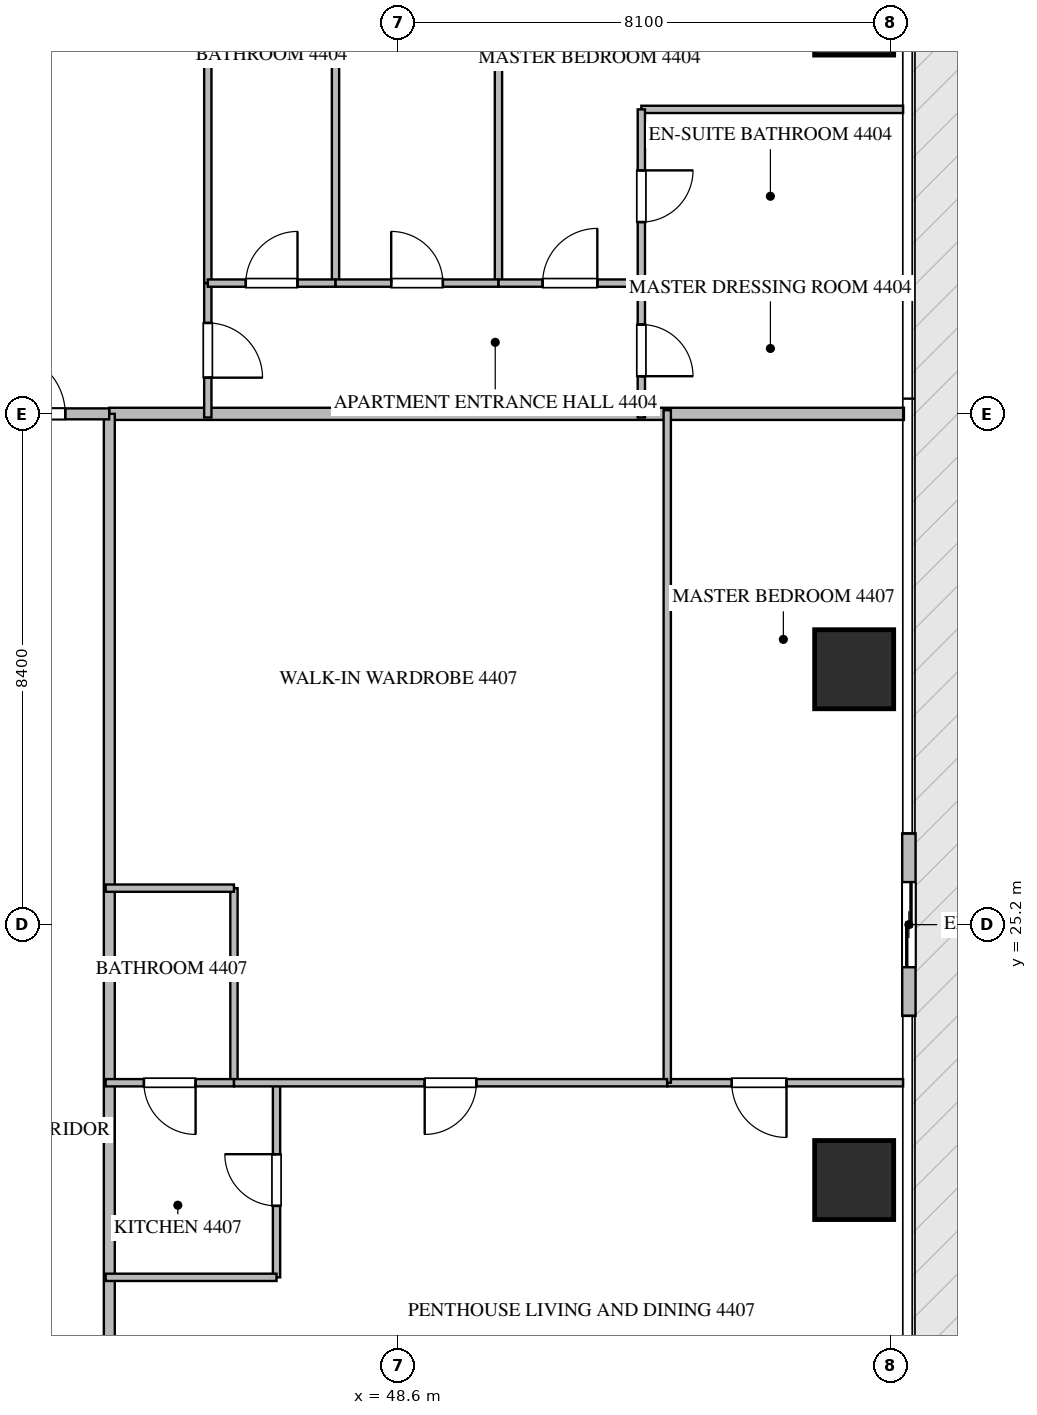
"""IFC4 building model, lengths in metres.
Left out: names, types, materials, properties, quantities, classifications, styles, units other than length and angle.
Written with IfcOpenShell. Run it as: python <this file> out.ifc"""

import sys

from ifc_helpers import new_model, si_unit, direction, frame, frame_2d, origin, origin_2d, place, context, subcontext, project, spatial, rectangle, extrude, source, transform, mapped, element, fill, save


model = new_model("IFC4")
c1 = context("Model", 3, precision=1e-05, world=origin(), true_north=direction((0.0, 1.0)))
c2 = subcontext(c1, "Body", "Model", "MODEL_VIEW")
j1 = project(units=[si_unit("LENGTHUNIT", "METRE"), si_unit("PLANEANGLEUNIT", "RADIAN")], contexts=[c1])
p1 = place(None, origin())
s1 = spatial("IfcSite", under=j1, at=p1, CompositionType="ELEMENT")
p2 = place(p1, origin())
s2 = spatial("IfcBuilding", under=s1, at=p2, CompositionType="ELEMENT")
p3 = place(p2, frame((0.0, 0.0, 176.4)))
s3 = spatial("IfcBuildingStorey", under=s2, at=p3, CompositionType="ELEMENT", Elevation=176.4)
m1 = source(origin(), c2, "Body", "SweptSolid", [
    extrude(rectangle(XDim=1.3, YDim=1.3, at=origin_2d()), origin(), (0.0, 0.0, 1.0), 3.75),
])
for number, where, z_axis, x_axis in (
    (1, (56.1, 21.0, -0.26), (0.0, 0.0, 1.0), (1.0, 0.0, 0.0)),
    (2, (56.1, 29.4, -0.26), (0.0, 0.0, 1.0), (1.0, 0.0, 0.0)),
    (3, (56.1, 40.15, -0.26), (0.0, 0.0, 1.0), (1.0, 0.0, 0.0)),
):
    element("IfcColumn", number, at=place(p3, frame(where, z_axis=z_axis, x_axis=x_axis)), inside=s3, PredefinedType="COLUMN", context=c2, shape_type="MappedRepresentation", body=[
        mapped(m1, transform((0.0, 0.0, 0.0), scale=1.0)),
    ])
p4 = place(p3, frame((57.0, 23.7, 0.0), z_axis=(0.0, 0.0, 1.0), x_axis=(0.0, 1.0, 0.0)))
e4 = element("IfcWall", 4, at=p4, inside=s3, PredefinedType="ELEMENTEDWALL", context=c2, shape_type="SweptSolid", body=[
    extrude(rectangle(XDim=3.0, YDim=0.22, at=frame_2d((1.5, 0.0))), origin(), (0.0, 0.0, 1.0), 3.475),
])
p5 = place(p4, frame((0.8, 0.0, 0.0)))
e5 = element("IfcOpeningElement", 5, at=p5, cuts=e4, PredefinedType="OPENING", context=c2, shape_type="SweptSolid", body=[
    extrude(rectangle(XDim=1.4, YDim=2.25, at=frame_2d((0.7, 1.125))), frame((0.0, 0.12, 0.0), z_axis=(0.0, -1.0, 0.0), x_axis=(1.0, 0.0, 0.0)), (0.0, 0.0, 1.0), 0.24),
])
p6 = place(p3, frame((43.85, 33.6, 0.0), z_axis=(0.0, 0.0, 1.0), x_axis=(1.0, 0.0, 0.0)))
e6 = element("IfcWall", 6, at=p6, inside=s3, PredefinedType="PARTITIONING", context=c2, shape_type="SweptSolid", body=[
    extrude(rectangle(XDim=13.068, YDim=0.2, at=frame_2d((6.534, 0.0))), origin(), (0.0, 0.0, 1.0), 3.49),
])
p7 = place(p3, frame((43.85, 14.9, 0.0), z_axis=(0.0, 0.0, 1.0), x_axis=(0.0, 1.0, 0.0)))
e7 = element("IfcWall", 7, at=p7, inside=s3, PredefinedType="PARTITIONING", context=c2, shape_type="SweptSolid", body=[
    extrude(rectangle(XDim=18.7, YDim=0.18, at=frame_2d((9.35, 0.0))), origin(), (0.0, 0.0, 1.0), 3.49),
])
p8 = place(p7, frame((1.805, 0.0, 0.0)))
e8 = element("IfcOpeningElement", 8, at=p8, cuts=e7, PredefinedType="OPENING", context=c2, shape_type="SweptSolid", body=[
    extrude(rectangle(XDim=1.0, YDim=2.15, at=frame_2d((0.5, 1.075))), frame((0.0, 0.1, 0.0), z_axis=(0.0, -1.0, 0.0), x_axis=(1.0, 0.0, 0.0)), (0.0, 0.0, 1.0), 0.2),
])
p9 = place(p3, frame((41.402, 33.6, 0.0), z_axis=(0.0, 0.0, 1.0), x_axis=(1.0, 0.0, 0.0)))
e9 = element("IfcWall", 9, at=p9, inside=s3, PredefinedType="PARTITIONING", context=c2, shape_type="SweptSolid", body=[
    extrude(rectangle(XDim=2.446, YDim=0.18, at=frame_2d((1.223, 0.0))), origin(), (0.0, 0.0, 1.0), 3.49),
])
p10 = place(p9, frame((0.723, 0.0, 0.0)))
e10 = element("IfcOpeningElement", 10, at=p10, cuts=e9, PredefinedType="OPENING", context=c2, shape_type="SweptSolid", body=[
    extrude(rectangle(XDim=1.0, YDim=2.15, at=frame_2d((0.5, 1.075))), frame((0.0, 0.1, 0.0), z_axis=(0.0, -1.0, 0.0), x_axis=(1.0, 0.0, 0.0)), (0.0, 0.0, 1.0), 0.2),
])
p11 = place(p3, frame((45.47, 35.75, 0.0), z_axis=(0.0, 0.0, 1.0), x_axis=(0.0, -1.0, 0.0)))
e11 = element("IfcWall", 11, at=p11, inside=s3, PredefinedType="PARTITIONING", context=c2, shape_type="SweptSolid", body=[
    extrude(rectangle(XDim=2.21, YDim=0.12, at=frame_2d((1.105, 0.0))), origin(), (0.0, 0.0, 1.0), 3.49),
])
p12 = place(p11, frame((0.655, 0.0, 0.0)))
e12 = element("IfcOpeningElement", 12, at=p12, cuts=e11, PredefinedType="OPENING", context=c2, shape_type="SweptSolid", body=[
    extrude(rectangle(XDim=0.9, YDim=2.1, at=frame_2d((0.45, 1.05))), frame((0.0, 0.07, 0.0), z_axis=(0.0, -1.0, 0.0), x_axis=(1.0, 0.0, 0.0)), (0.0, 0.0, 1.0), 0.14),
])
p13 = place(p3, frame((45.47, 43.46, 0.0), z_axis=(0.0, 0.0, 1.0), x_axis=(0.0, -1.0, 0.0)))
e13 = element("IfcWall", 13, at=p13, inside=s3, PredefinedType="PARTITIONING", context=c2, shape_type="SweptSolid", body=[
    extrude(rectangle(XDim=7.708, YDim=0.12, at=frame_2d((3.854, 0.0))), origin(), (0.0, 0.0, 1.0), 3.49),
])
p14 = place(p3, frame((50.25, 44.905, 0.0), z_axis=(0.0, 0.0, 1.0), x_axis=(0.0, -1.0, 0.0)))
e14 = element("IfcWall", 14, at=p14, inside=s3, PredefinedType="PARTITIONING", context=c2, shape_type="SweptSolid", body=[
    extrude(rectangle(XDim=9.155, YDim=0.12, at=frame_2d((4.578, 0.0))), origin(), (0.0, 0.0, 1.0), 3.49),
])
p15 = place(p3, frame((47.57, 43.462, 0.0), z_axis=(0.0, 0.0, 1.0), x_axis=(0.0, -1.0, 0.0)))
e15 = element("IfcWall", 15, at=p15, inside=s3, PredefinedType="PARTITIONING", context=c2, shape_type="SweptSolid", body=[
    extrude(rectangle(XDim=7.712, YDim=0.12, at=frame_2d((3.856, 0.0))), origin(), (0.0, 0.0, 1.0), 3.49),
])
p16 = place(p3, frame((45.47, 35.75, 0.0), z_axis=(0.0, 0.0, 1.0), x_axis=(1.0, 0.0, 0.0)))
e16 = element("IfcWall", 16, at=p16, inside=s3, PredefinedType="PARTITIONING", context=c2, shape_type="SweptSolid", body=[
    extrude(rectangle(XDim=2.1, YDim=0.12, at=frame_2d((1.05, 0.0))), origin(), (0.0, 0.0, 1.0), 3.49),
])
p17 = place(p16, frame((0.625, 0.0, 0.0)))
e17 = element("IfcOpeningElement", 17, at=p17, cuts=e16, PredefinedType="OPENING", context=c2, shape_type="SweptSolid", body=[
    extrude(rectangle(XDim=0.85, YDim=2.1, at=frame_2d((0.425, 1.05))), frame((0.0, 0.07, 0.0), z_axis=(0.0, -1.0, 0.0), x_axis=(1.0, 0.0, 0.0)), (0.0, 0.0, 1.0), 0.14),
])
p18 = place(p3, frame((47.572, 35.75, 0.0), z_axis=(0.0, 0.0, 1.0), x_axis=(1.0, 0.0, 0.0)))
e18 = element("IfcWall", 18, at=p18, inside=s3, PredefinedType="PARTITIONING", context=c2, shape_type="SweptSolid", body=[
    extrude(rectangle(XDim=2.678, YDim=0.12, at=frame_2d((1.339, 0.0))), origin(), (0.0, 0.0, 1.0), 3.49),
])
p19 = place(p18, frame((0.914, 0.0, 0.0)))
e19 = element("IfcOpeningElement", 19, at=p19, cuts=e18, PredefinedType="OPENING", context=c2, shape_type="SweptSolid", body=[
    extrude(rectangle(XDim=0.85, YDim=2.1, at=frame_2d((0.425, 1.05))), frame((0.0, 0.07, 0.0), z_axis=(0.0, -1.0, 0.0), x_axis=(1.0, 0.0, 0.0)), (0.0, 0.0, 1.0), 0.14),
])
p20 = place(p3, frame((50.252, 35.75, 0.0), z_axis=(0.0, 0.0, 1.0), x_axis=(1.0, 0.0, 0.0)))
e20 = element("IfcWall", 20, at=p20, inside=s3, PredefinedType="PARTITIONING", context=c2, shape_type="SweptSolid", body=[
    extrude(rectangle(XDim=2.348, YDim=0.12, at=frame_2d((1.174, 0.0))), origin(), (0.0, 0.0, 1.0), 3.49),
])
p21 = place(p20, frame((0.724, 0.0, 0.0)))
e21 = element("IfcOpeningElement", 21, at=p21, cuts=e20, PredefinedType="OPENING", context=c2, shape_type="SweptSolid", body=[
    extrude(rectangle(XDim=0.9, YDim=2.1, at=frame_2d((0.45, 1.05))), frame((0.0, 0.07, 0.0), z_axis=(0.0, -1.0, 0.0), x_axis=(1.0, 0.0, 0.0)), (0.0, 0.0, 1.0), 0.14),
])
p22 = place(p3, frame((52.6, 38.607, 0.0), z_axis=(0.0, 0.0, 1.0), x_axis=(1.0, 0.0, 0.0)))
e22 = element("IfcWall", 22, at=p22, inside=s3, PredefinedType="PARTITIONING", context=c2, shape_type="SweptSolid", body=[
    extrude(rectangle(XDim=4.305, YDim=0.12, at=frame_2d((2.152, 0.0))), origin(), (0.0, 0.0, 1.0), 3.49),
])
p23 = place(p3, frame((52.602, 35.75, 0.0), z_axis=(0.0, 0.0, 1.0), x_axis=(1.0, 0.0, 0.0)))
e23 = element("IfcWall", 23, at=p23, inside=s3, PredefinedType="PARTITIONING", context=c2, shape_type="SweptSolid", body=[
    extrude(rectangle(XDim=4.303, YDim=0.12, at=frame_2d((2.151, 0.0))), origin(), (0.0, 0.0, 1.0), 3.49),
])
p24 = place(p3, frame((52.6, 38.607, 0.0), z_axis=(0.0, 0.0, 1.0), x_axis=(0.0, -1.0, 0.0)))
e24 = element("IfcWall", 24, at=p24, inside=s3, PredefinedType="PARTITIONING", context=c2, shape_type="SweptSolid", body=[
    extrude(rectangle(XDim=2.857, YDim=0.12, at=frame_2d((1.428, 0.0))), origin(), (0.0, 0.0, 1.0), 3.49),
])
p25 = place(p24, frame((1.003, 0.0, 0.0)))
e25 = element("IfcOpeningElement", 25, at=p25, cuts=e24, PredefinedType="OPENING", context=c2, shape_type="SweptSolid", body=[
    extrude(rectangle(XDim=0.85, YDim=2.1, at=frame_2d((0.425, 1.05))), frame((0.0, 0.07, 0.0), z_axis=(0.0, -1.0, 0.0), x_axis=(1.0, 0.0, 0.0)), (0.0, 0.0, 1.0), 0.14),
])
p26 = place(p3, frame((52.6, 35.748, 0.0), z_axis=(0.0, 0.0, 1.0), x_axis=(0.0, -1.0, 0.0)))
e26 = element("IfcWall", 26, at=p26, inside=s3, PredefinedType="PARTITIONING", context=c2, shape_type="SweptSolid", body=[
    extrude(rectangle(XDim=2.208, YDim=0.12, at=frame_2d((1.104, 0.0))), origin(), (0.0, 0.0, 1.0), 3.49),
])
p27 = place(p26, frame((0.679, 0.0, 0.0)))
e27 = element("IfcOpeningElement", 27, at=p27, cuts=e26, PredefinedType="OPENING", context=c2, shape_type="SweptSolid", body=[
    extrude(rectangle(XDim=0.85, YDim=2.1, at=frame_2d((0.425, 1.05))), frame((0.0, 0.07, 0.0), z_axis=(0.0, -1.0, 0.0), x_axis=(1.0, 0.0, 0.0)), (0.0, 0.0, 1.0), 0.14),
])
p28 = place(p3, frame((46.6, 19.4, 0.0), z_axis=(0.0, 0.0, 1.0), x_axis=(0.0, 1.0, 0.0)))
e28 = element("IfcWall", 28, at=p28, inside=s3, PredefinedType="PARTITIONING", context=c2, shape_type="SweptSolid", body=[
    extrude(rectangle(XDim=3.2, YDim=0.12, at=frame_2d((1.6, 0.0))), origin(), (0.0, 0.0, 1.0), 3.49),
])
p29 = place(p28, frame((1.175, 0.0, 0.0)))
e29 = element("IfcOpeningElement", 29, at=p29, cuts=e28, PredefinedType="OPENING", context=c2, shape_type="SweptSolid", body=[
    extrude(rectangle(XDim=0.85, YDim=2.1, at=frame_2d((0.425, 1.05))), frame((0.0, 0.07, 0.0), z_axis=(0.0, -1.0, 0.0), x_axis=(1.0, 0.0, 0.0)), (0.0, 0.0, 1.0), 0.14),
])
p30 = place(p3, frame((46.6, 19.4, 0.0), z_axis=(0.0, 0.0, 1.0), x_axis=(-1.0, 0.0, 0.0)))
e30 = element("IfcWall", 30, at=p30, inside=s3, PredefinedType="PARTITIONING", context=c2, shape_type="SweptSolid", body=[
    extrude(rectangle(XDim=2.81, YDim=0.12, at=frame_2d((1.405, 0.0))), origin(), (0.0, 0.0, 1.0), 3.49),
])
p31 = place(p3, frame((56.905, 22.6, 0.0), z_axis=(0.0, 0.0, 1.0), x_axis=(-1.0, 0.0, 0.0)))
e31 = element("IfcWall", 31, at=p31, inside=s3, PredefinedType="PARTITIONING", context=c2, shape_type="SweptSolid", body=[
    extrude(rectangle(XDim=3.879, YDim=0.12, at=frame_2d((1.939, 0.0))), origin(), (0.0, 0.0, 1.0), 3.49),
])
p32 = place(p31, frame((1.918, 0.0, 0.0)))
e32 = element("IfcOpeningElement", 32, at=p32, cuts=e31, PredefinedType="OPENING", context=c2, shape_type="SweptSolid", body=[
    extrude(rectangle(XDim=0.9, YDim=2.1, at=frame_2d((0.45, 1.05))), frame((0.0, 0.07, 0.0), z_axis=(0.0, -1.0, 0.0), x_axis=(1.0, 0.0, 0.0)), (0.0, 0.0, 1.0), 0.14),
])
p33 = place(p3, frame((53.026, 22.6, 0.0), z_axis=(0.0, 0.0, 1.0), x_axis=(0.0, 1.0, 0.0)))
e33 = element("IfcWall", 33, at=p33, inside=s3, PredefinedType="PARTITIONING", context=c2, shape_type="SweptSolid", body=[
    extrude(rectangle(XDim=11.06, YDim=0.12, at=frame_2d((5.53, 0.0))), origin(), (0.0, 0.0, 1.0), 3.49),
])
p34 = place(p3, frame((45.9, 22.6, 0.0), z_axis=(0.0, 0.0, 1.0), x_axis=(0.0, 1.0, 0.0)))
e34 = element("IfcWall", 34, at=p34, inside=s3, PredefinedType="PARTITIONING", context=c2, shape_type="SweptSolid", body=[
    extrude(rectangle(XDim=3.2, YDim=0.12, at=frame_2d((1.6, 0.0))), origin(), (0.0, 0.0, 1.0), 3.49),
])
p35 = place(p3, frame((45.9, 25.8, 0.0), z_axis=(0.0, 0.0, 1.0), x_axis=(-1.0, 0.0, 0.0)))
e35 = element("IfcWall", 35, at=p35, inside=s3, PredefinedType="PARTITIONING", context=c2, shape_type="SweptSolid", body=[
    extrude(rectangle(XDim=2.11, YDim=0.12, at=frame_2d((1.055, 0.0))), origin(), (0.0, 0.0, 1.0), 3.49),
])
p36 = place(p3, frame((53.024, 22.6, 0.0), z_axis=(0.0, 0.0, 1.0), x_axis=(-1.0, 0.0, 0.0)))
e36 = element("IfcWall", 36, at=p36, inside=s3, PredefinedType="PARTITIONING", context=c2, shape_type="SweptSolid", body=[
    extrude(rectangle(XDim=7.124, YDim=0.12, at=frame_2d((3.562, 0.0))), origin(), (0.0, 0.0, 1.0), 3.49),
])
p37 = place(p36, frame((3.137, 0.0, 0.0)))
e37 = element("IfcOpeningElement", 37, at=p37, cuts=e36, PredefinedType="OPENING", context=c2, shape_type="SweptSolid", body=[
    extrude(rectangle(XDim=0.85, YDim=2.1, at=frame_2d((0.425, 1.05))), frame((0.0, 0.07, 0.0), z_axis=(0.0, -1.0, 0.0), x_axis=(1.0, 0.0, 0.0)), (0.0, 0.0, 1.0), 0.14),
])
p38 = place(p3, frame((45.898, 22.6, 0.0), z_axis=(0.0, 0.0, 1.0), x_axis=(-1.0, 0.0, 0.0)))
e38 = element("IfcWall", 38, at=p38, inside=s3, PredefinedType="PARTITIONING", context=c2, shape_type="SweptSolid", body=[
    extrude(rectangle(XDim=2.108, YDim=0.12, at=frame_2d((1.054, 0.0))), origin(), (0.0, 0.0, 1.0), 3.49),
])
p39 = place(p38, frame((0.629, 0.0, 0.0)))
e39 = element("IfcOpeningElement", 39, at=p39, cuts=e38, PredefinedType="OPENING", context=c2, shape_type="SweptSolid", body=[
    extrude(rectangle(XDim=0.85, YDim=2.1, at=frame_2d((0.425, 1.05))), frame((0.0, 0.07, 0.0), z_axis=(0.0, -1.0, 0.0), x_axis=(1.0, 0.0, 0.0)), (0.0, 0.0, 1.0), 0.14),
])
m2 = source(origin(), c2, "Body", "SweptSolid", [
    extrude(rectangle(XDim=1.4, YDim=2.25, at=frame_2d((0.7, 1.125))), frame((0.0, 0.025, 0.0), z_axis=(0.0, -1.0, 0.0), x_axis=(1.0, 0.0, 0.0)), (0.0, 0.0, 1.0), 0.05),
])
p40 = place(p5, origin())
e40 = element("IfcDoor", 40, at=p40, inside=s3, OperationType="SLIDING_TO_LEFT", PredefinedType="DOOR", context=c2, shape_type="MappedRepresentation", body=[
    mapped(m2, transform((0.0, 0.0, 0.0), scale=1.0)),
])
fill(e5, e40)
m3 = source(origin(), c2, "Body", "SweptSolid", [
    extrude(rectangle(XDim=1.0, YDim=2.15, at=frame_2d((0.5, 1.075))), frame((0.0, 0.025, 0.0), z_axis=(0.0, -1.0, 0.0), x_axis=(1.0, 0.0, 0.0)), (0.0, 0.0, 1.0), 0.05),
])
p41 = place(p10, origin())
e41 = element("IfcDoor", 41, at=p41, inside=s3, OperationType="SINGLE_SWING_LEFT", PredefinedType="DOOR", context=c2, shape_type="MappedRepresentation", body=[
    mapped(m3, transform((0.0, 0.0, 0.0), scale=1.0)),
])
fill(e10, e41)
m4 = source(origin(), c2, "Body", "SweptSolid", [
    extrude(rectangle(XDim=0.9, YDim=2.1, at=frame_2d((0.45, 1.05))), frame((0.0, 0.025, 0.0), z_axis=(0.0, -1.0, 0.0), x_axis=(1.0, 0.0, 0.0)), (0.0, 0.0, 1.0), 0.05),
])
p42 = place(p12, origin())
e42 = element("IfcDoor", 42, at=p42, inside=s3, OperationType="SINGLE_SWING_RIGHT", PredefinedType="DOOR", context=c2, shape_type="MappedRepresentation", body=[
    mapped(m4, transform((0.0, 0.0, 0.0), scale=1.0)),
])
fill(e12, e42)
m5 = source(origin(), c2, "Body", "SweptSolid", [
    extrude(rectangle(XDim=0.85, YDim=2.1, at=frame_2d((0.425, 1.05))), frame((0.0, 0.025, 0.0), z_axis=(0.0, -1.0, 0.0), x_axis=(1.0, 0.0, 0.0)), (0.0, 0.0, 1.0), 0.05),
])
p43 = place(p17, origin())
e43 = element("IfcDoor", 43, at=p43, inside=s3, OperationType="SINGLE_SWING_RIGHT", PredefinedType="DOOR", context=c2, shape_type="MappedRepresentation", body=[
    mapped(m5, transform((0.0, 0.0, 0.0), scale=1.0)),
])
fill(e17, e43)
p44 = place(p19, origin())
e44 = element("IfcDoor", 44, at=p44, inside=s3, OperationType="SINGLE_SWING_LEFT", PredefinedType="DOOR", context=c2, shape_type="MappedRepresentation", body=[
    mapped(m5, transform((0.0, 0.0, 0.0), scale=1.0)),
])
fill(e19, e44)
p45 = place(p21, origin())
e45 = element("IfcDoor", 45, at=p45, inside=s3, OperationType="SINGLE_SWING_RIGHT", PredefinedType="DOOR", context=c2, shape_type="MappedRepresentation", body=[
    mapped(m4, transform((0.0, 0.0, 0.0), scale=1.0)),
])
fill(e21, e45)
p46 = place(p25, origin())
e46 = element("IfcDoor", 46, at=p46, inside=s3, OperationType="SINGLE_SWING_LEFT", PredefinedType="DOOR", context=c2, shape_type="MappedRepresentation", body=[
    mapped(m5, transform((0.0, 0.0, 0.0), scale=1.0)),
])
fill(e25, e46)
p47 = place(p27, origin())
e47 = element("IfcDoor", 47, at=p47, inside=s3, OperationType="SINGLE_SWING_RIGHT", PredefinedType="DOOR", context=c2, shape_type="MappedRepresentation", body=[
    mapped(m5, transform((0.0, 0.0, 0.0), scale=1.0)),
])
fill(e27, e47)
p48 = place(p29, origin())
e48 = element("IfcDoor", 48, at=p48, inside=s3, OperationType="SINGLE_SWING_RIGHT", PredefinedType="DOOR", context=c2, shape_type="MappedRepresentation", body=[
    mapped(m5, transform((0.0, 0.0, 0.0), scale=1.0)),
])
fill(e29, e48)
p49 = place(p32, origin())
e49 = element("IfcDoor", 49, at=p49, inside=s3, OperationType="SINGLE_SWING_LEFT", PredefinedType="DOOR", context=c2, shape_type="MappedRepresentation", body=[
    mapped(m4, transform((0.0, 0.0, 0.0), scale=1.0)),
])
fill(e32, e49)
p50 = place(p37, origin())
e50 = element("IfcDoor", 50, at=p50, inside=s3, OperationType="SINGLE_SWING_RIGHT", PredefinedType="DOOR", context=c2, shape_type="MappedRepresentation", body=[
    mapped(m5, transform((0.0, 0.0, 0.0), scale=1.0)),
])
fill(e37, e50)
p51 = place(p39, origin())
e51 = element("IfcDoor", 51, at=p51, inside=s3, OperationType="SINGLE_SWING_LEFT", PredefinedType="DOOR", context=c2, shape_type="MappedRepresentation", body=[
    mapped(m5, transform((0.0, 0.0, 0.0), scale=1.0)),
])
fill(e39, e51)
save(model, sys.argv[1])
